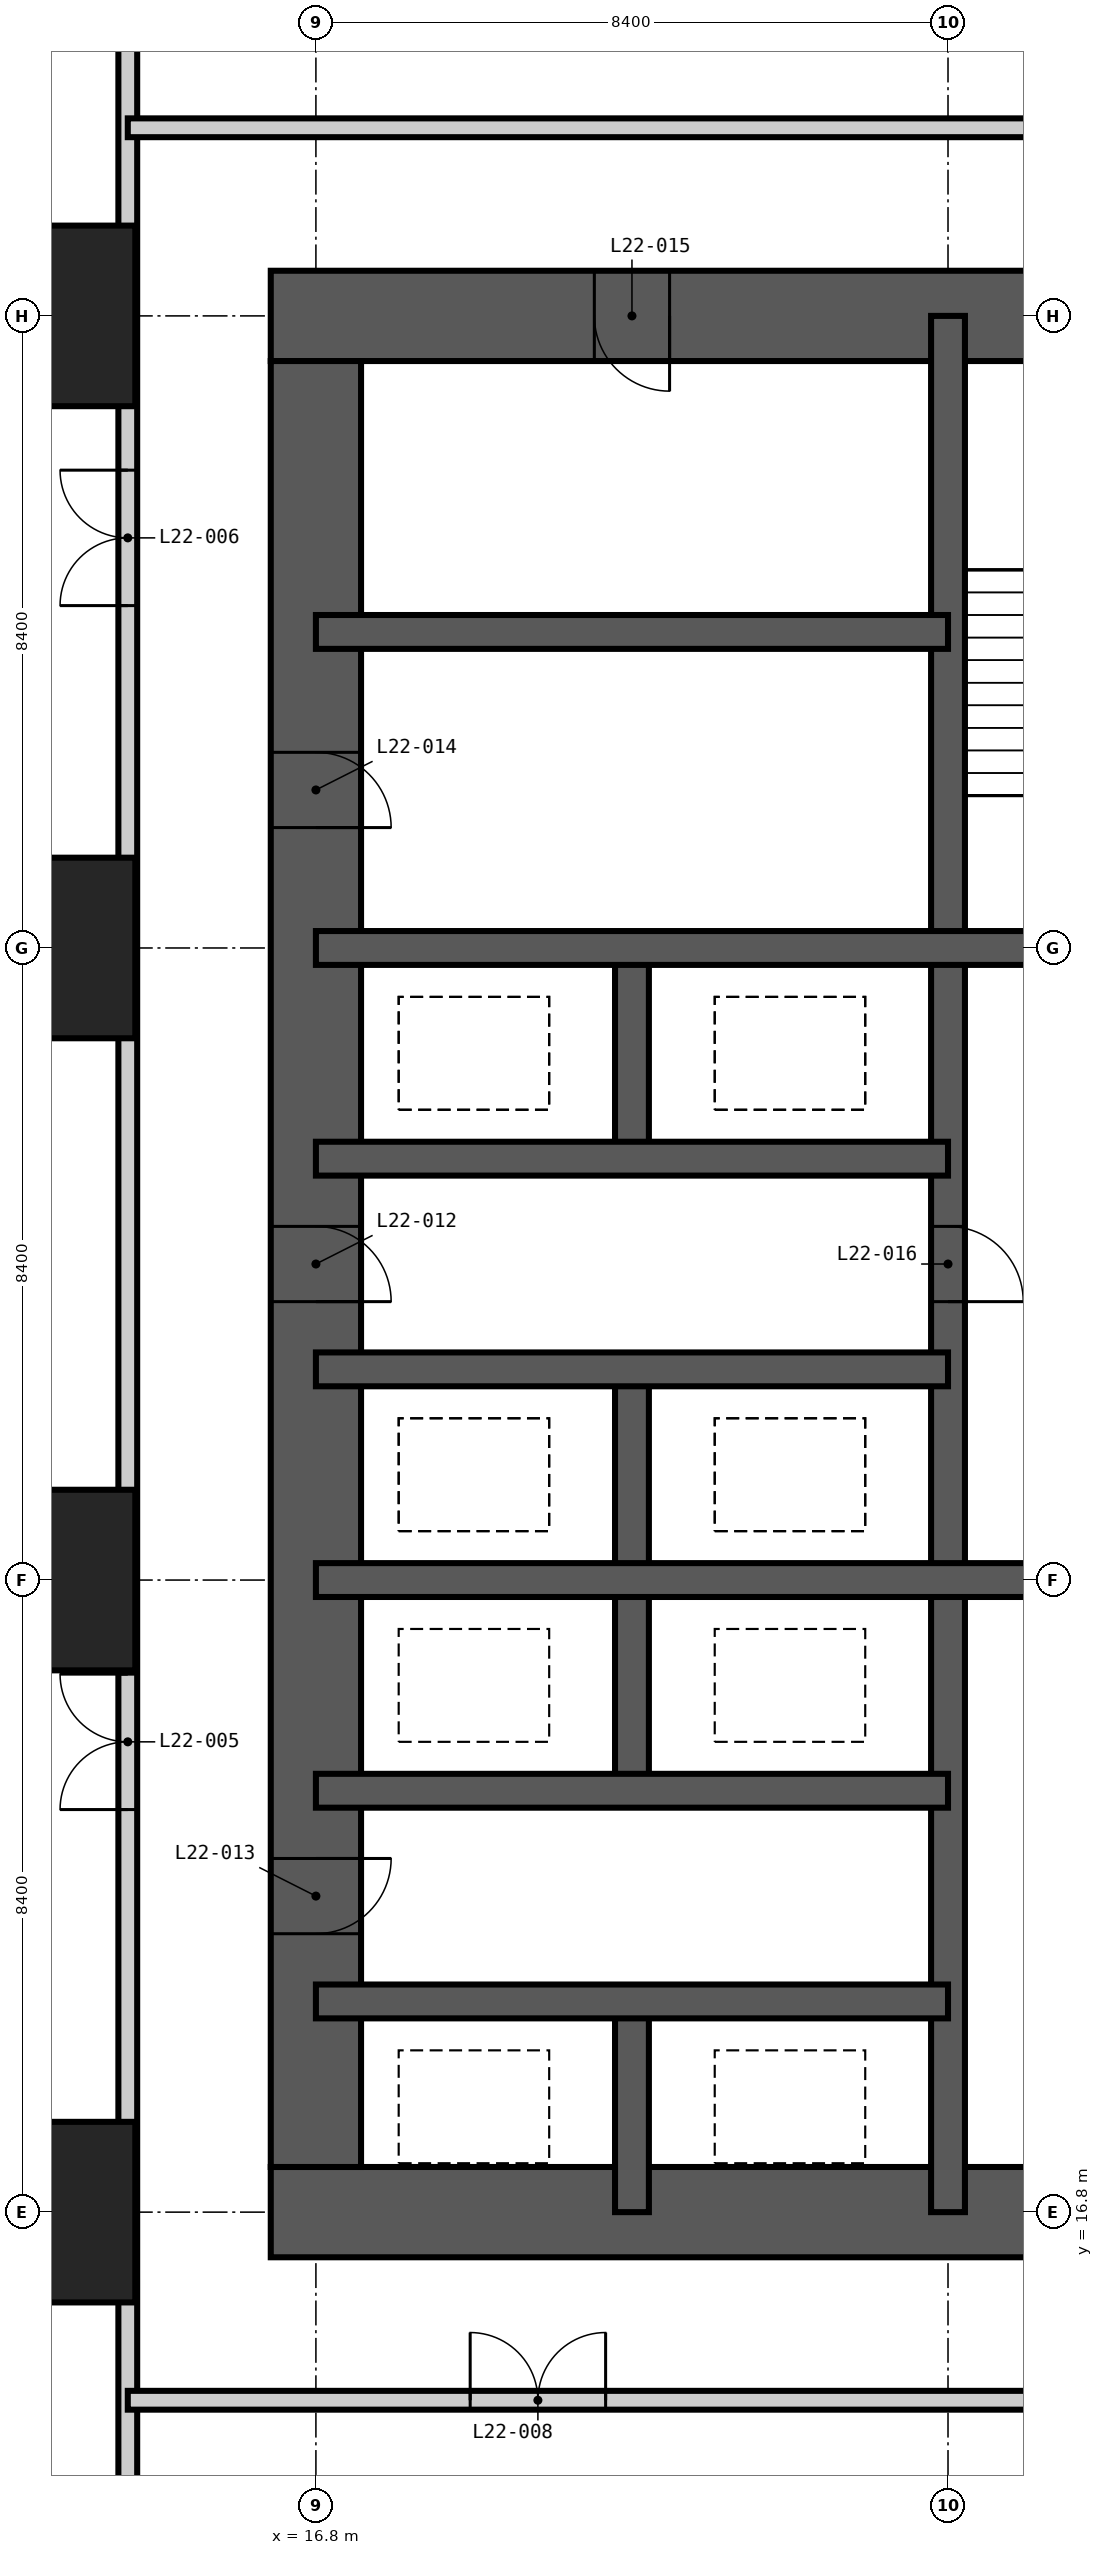
"""IFC4 building model, lengths in metres.
Left out: names, types, materials, properties, quantities, classifications, styles, units other than length and angle.
Written with IfcOpenShell. Run it as: python <this file> out.ifc"""

import sys

from ifc_helpers import new_model, si_unit, direction, frame, frame_2d, origin, origin_2d, place, context, subcontext, project, spatial, rectangle, extrude, element, fill, save


model = new_model("IFC4")
c1 = context("Model", 3, precision=1e-05, world=origin(), true_north=direction((0.0, 1.0)))
c2 = subcontext(c1, "Body", "Model", "MODEL_VIEW")
j1 = project(units=[si_unit("LENGTHUNIT", "METRE"), si_unit("PLANEANGLEUNIT", "RADIAN")], contexts=[c1])
p1 = place(None, origin())
s1 = spatial("IfcSite", under=j1, at=p1, CompositionType="ELEMENT")
p2 = place(p1, origin())
s2 = spatial("IfcBuilding", under=s1, at=p2, CompositionType="ELEMENT")
p3 = place(p2, frame((0.0, 0.0, 88.2)))
s3 = spatial("IfcBuildingStorey", under=s2, at=p3, CompositionType="ELEMENT", Elevation=88.2)
for number, where, z_axis, x_axis in (
    (1, (13.2, 16.8, -0.4), (0.0, 0.0, 1.0), (1.0, 0.0, 0.0)),
    (2, (13.2, 25.2, -0.4), (0.0, 0.0, 1.0), (1.0, 0.0, 0.0)),
    (3, (13.2, 33.6, -0.4), (0.0, 0.0, 1.0), (1.0, 0.0, 0.0)),
    (4, (13.2, 42.0, -0.4), (0.0, 0.0, 1.0), (1.0, 0.0, 0.0)),
):
    element("IfcColumn", number, at=place(p3, frame(where, z_axis=z_axis, x_axis=x_axis)), inside=s3, PredefinedType="COLUMN", context=c2, shape_type="SweptSolid", body=[
        extrude(rectangle(XDim=2.4, YDim=2.4, at=origin_2d()), origin(), (0.0, 0.0, 1.0), 5.45),
    ])
p4 = place(p3, frame((16.2, 16.8, -0.4), z_axis=(0.0, 0.0, 1.0), x_axis=(1.0, 0.0, 0.0)))
e5 = element("IfcWall", 5, at=p4, inside=s3, PredefinedType="SHEAR", context=c2, shape_type="SweptSolid", body=[
    extrude(rectangle(XDim=26.4, YDim=1.2, at=frame_2d((13.2, 0.0))), origin(), (0.0, 0.0, 1.0), 5.45),
])
p5 = place(p4, frame((12.7, 0.0, 0.4)))
e6 = element("IfcOpeningElement", 6, at=p5, cuts=e5, PredefinedType="OPENING", context=c2, shape_type="SweptSolid", body=[
    extrude(rectangle(XDim=1.0, YDim=2.1, at=frame_2d((0.5, 1.05))), frame((0.0, 0.61, 0.0), z_axis=(0.0, -1.0, 0.0), x_axis=(1.0, 0.0, 0.0)), (0.0, 0.0, 1.0), 1.22),
])
p6 = place(p4, frame((19.0, 0.0, 0.4)))
e7 = element("IfcOpeningElement", 7, at=p6, cuts=e5, PredefinedType="OPENING", context=c2, shape_type="SweptSolid", body=[
    extrude(rectangle(XDim=1.0, YDim=2.1, at=frame_2d((0.5, 1.05))), frame((0.0, 0.61, 0.0), z_axis=(0.0, -1.0, 0.0), x_axis=(1.0, 0.0, 0.0)), (0.0, 0.0, 1.0), 1.22),
])
p7 = place(p3, frame((42.6, 42.0, -0.4), z_axis=(0.0, 0.0, 1.0), x_axis=(-1.0, 0.0, 0.0)))
e8 = element("IfcWall", 8, at=p7, inside=s3, PredefinedType="SHEAR", context=c2, shape_type="SweptSolid", body=[
    extrude(rectangle(XDim=26.4, YDim=1.2, at=frame_2d((13.2, 0.0))), origin(), (0.0, 0.0, 1.0), 5.45),
])
p8 = place(p7, frame((21.1, 0.0, 0.4)))
e9 = element("IfcOpeningElement", 9, at=p8, cuts=e8, PredefinedType="OPENING", context=c2, shape_type="SweptSolid", body=[
    extrude(rectangle(XDim=1.0, YDim=2.1, at=frame_2d((0.5, 1.05))), frame((0.0, 0.61, 0.0), z_axis=(0.0, -1.0, 0.0), x_axis=(1.0, 0.0, 0.0)), (0.0, 0.0, 1.0), 1.22),
])
p9 = place(p7, frame((10.5, 0.0, 0.4)))
e10 = element("IfcOpeningElement", 10, at=p9, cuts=e8, PredefinedType="OPENING", context=c2, shape_type="SweptSolid", body=[
    extrude(rectangle(XDim=1.2, YDim=2.2, at=frame_2d((0.6, 1.1))), frame((0.0, 0.61, 0.0), z_axis=(0.0, -1.0, 0.0), x_axis=(1.0, 0.0, 0.0)), (0.0, 0.0, 1.0), 1.22),
])
p10 = place(p3, frame((16.8, 41.4, -0.4), z_axis=(0.0, 0.0, 1.0), x_axis=(0.0, -1.0, 0.0)))
e11 = element("IfcWall", 11, at=p10, inside=s3, PredefinedType="SHEAR", context=c2, shape_type="SweptSolid", body=[
    extrude(rectangle(XDim=24.0, YDim=1.2, at=frame_2d((12.0, 0.0))), origin(), (0.0, 0.0, 1.0), 5.45),
])
p11 = place(p10, frame((11.5, 0.0, 0.4)))
e12 = element("IfcOpeningElement", 12, at=p11, cuts=e11, PredefinedType="OPENING", context=c2, shape_type="SweptSolid", body=[
    extrude(rectangle(XDim=1.0, YDim=2.1, at=frame_2d((0.5, 1.05))), frame((0.0, 0.61, 0.0), z_axis=(0.0, -1.0, 0.0), x_axis=(1.0, 0.0, 0.0)), (0.0, 0.0, 1.0), 1.22),
])
p12 = place(p10, frame((19.9, 0.0, 0.4)))
e13 = element("IfcOpeningElement", 13, at=p12, cuts=e11, PredefinedType="OPENING", context=c2, shape_type="SweptSolid", body=[
    extrude(rectangle(XDim=1.0, YDim=2.1, at=frame_2d((0.5, 1.05))), frame((0.0, 0.61, 0.0), z_axis=(0.0, -1.0, 0.0), x_axis=(1.0, 0.0, 0.0)), (0.0, 0.0, 1.0), 1.22),
])
p13 = place(p10, frame((5.2, 0.0, 0.4)))
e14 = element("IfcOpeningElement", 14, at=p13, cuts=e11, PredefinedType="OPENING", context=c2, shape_type="SweptSolid", body=[
    extrude(rectangle(XDim=1.0, YDim=2.1, at=frame_2d((0.5, 1.05))), frame((0.0, 0.61, 0.0), z_axis=(0.0, -1.0, 0.0), x_axis=(1.0, 0.0, 0.0)), (0.0, 0.0, 1.0), 1.22),
])
p14 = place(p3, frame((21.0, 16.8, -0.4), z_axis=(0.0, 0.0, 1.0), x_axis=(0.0, 1.0, 0.0)))
e15 = element("IfcWall", 15, at=p14, inside=s3, PredefinedType="SHEAR", context=c2, shape_type="SweptSolid", body=[
    extrude(rectangle(XDim=2.8, YDim=0.45, at=frame_2d((1.4, 0.0))), origin(), (0.0, 0.0, 1.0), 5.45),
])
p15 = place(p3, frame((21.0, 22.4, -0.4), z_axis=(0.0, 0.0, 1.0), x_axis=(0.0, 1.0, 0.0)))
e16 = element("IfcWall", 16, at=p15, inside=s3, PredefinedType="SHEAR", context=c2, shape_type="SweptSolid", body=[
    extrude(rectangle(XDim=5.6, YDim=0.45, at=frame_2d((2.8, 0.0))), origin(), (0.0, 0.0, 1.0), 5.45),
])
p16 = place(p3, frame((21.0, 30.8, -0.4), z_axis=(0.0, 0.0, 1.0), x_axis=(0.0, 1.0, 0.0)))
e17 = element("IfcWall", 17, at=p16, inside=s3, PredefinedType="SHEAR", context=c2, shape_type="SweptSolid", body=[
    extrude(rectangle(XDim=2.8, YDim=0.45, at=frame_2d((1.4, 0.0))), origin(), (0.0, 0.0, 1.0), 5.45),
])
p17 = place(p3, frame((25.2, 16.8, -0.4), z_axis=(0.0, 0.0, 1.0), x_axis=(0.0, 1.0, 0.0)))
e18 = element("IfcWall", 18, at=p17, inside=s3, PredefinedType="SHEAR", context=c2, shape_type="SweptSolid", body=[
    extrude(rectangle(XDim=25.2, YDim=0.45, at=frame_2d((12.6, 0.0))), origin(), (0.0, 0.0, 1.0), 5.45),
])
p18 = place(p17, frame((12.1, 0.0, 0.4)))
e19 = element("IfcOpeningElement", 19, at=p18, cuts=e18, PredefinedType="OPENING", context=c2, shape_type="SweptSolid", body=[
    extrude(rectangle(XDim=1.0, YDim=2.1, at=frame_2d((0.5, 1.05))), frame((0.0, 0.235, 0.0), z_axis=(0.0, -1.0, 0.0), x_axis=(1.0, 0.0, 0.0)), (0.0, 0.0, 1.0), 0.47),
])
for number, where, z_axis, x_axis in (
    (20, (16.8, 19.6, -0.4), (0.0, 0.0, 1.0), (1.0, 0.0, 0.0)),
    (21, (16.8, 22.4, -0.4), (0.0, 0.0, 1.0), (1.0, 0.0, 0.0)),
):
    element("IfcWall", number, at=place(p3, frame(where, z_axis=z_axis, x_axis=x_axis)), inside=s3, PredefinedType="SHEAR", context=c2, shape_type="SweptSolid", body=[
        extrude(rectangle(XDim=8.4, YDim=0.45, at=frame_2d((4.2, 0.0))), origin(), (0.0, 0.0, 1.0), 5.45),
    ])
p19 = place(p3, frame((16.8, 25.2, -0.4), z_axis=(0.0, 0.0, 1.0), x_axis=(1.0, 0.0, 0.0)))
e22 = element("IfcWall", 22, at=p19, inside=s3, PredefinedType="SHEAR", context=c2, shape_type="SweptSolid", body=[
    extrude(rectangle(XDim=25.2, YDim=0.45, at=frame_2d((12.6, 0.0))), origin(), (0.0, 0.0, 1.0), 5.45),
])
for number, where, z_axis, x_axis in (
    (23, (16.8, 28.0, -0.4), (0.0, 0.0, 1.0), (1.0, 0.0, 0.0)),
    (24, (16.8, 30.8, -0.4), (0.0, 0.0, 1.0), (1.0, 0.0, 0.0)),
):
    element("IfcWall", number, at=place(p3, frame(where, z_axis=z_axis, x_axis=x_axis)), inside=s3, PredefinedType="SHEAR", context=c2, shape_type="SweptSolid", body=[
        extrude(rectangle(XDim=8.4, YDim=0.45, at=frame_2d((4.2, 0.0))), origin(), (0.0, 0.0, 1.0), 5.45),
    ])
p20 = place(p3, frame((16.8, 33.6, -0.4), z_axis=(0.0, 0.0, 1.0), x_axis=(1.0, 0.0, 0.0)))
e25 = element("IfcWall", 25, at=p20, inside=s3, PredefinedType="SHEAR", context=c2, shape_type="SweptSolid", body=[
    extrude(rectangle(XDim=25.2, YDim=0.45, at=frame_2d((12.6, 0.0))), origin(), (0.0, 0.0, 1.0), 5.45),
])
p21 = place(p3, frame((16.8, 37.8, -0.4), z_axis=(0.0, 0.0, 1.0), x_axis=(1.0, 0.0, 0.0)))
e26 = element("IfcWall", 26, at=p21, inside=s3, PredefinedType="SHEAR", context=c2, shape_type="SweptSolid", body=[
    extrude(rectangle(XDim=8.4, YDim=0.45, at=frame_2d((4.2, 0.0))), origin(), (0.0, 0.0, 1.0), 5.45),
])
p22 = place(p3, frame((14.3, -0.018, 0.0), z_axis=(0.0, 0.0, 1.0), x_axis=(0.0, 1.0, 0.0)))
e27 = element("IfcWall", 27, at=p22, inside=s3, PredefinedType="PARTITIONING", context=c2, shape_type="SweptSolid", body=[
    extrude(rectangle(XDim=58.836, YDim=0.25, at=frame_2d((29.418, 0.0))), origin(), (0.0, 0.0, 1.0), 5.05),
])
p23 = place(p22, frame((22.168, 0.0, 0.0)))
e28 = element("IfcOpeningElement", 28, at=p23, cuts=e27, PredefinedType="OPENING", context=c2, shape_type="SweptSolid", body=[
    extrude(rectangle(XDim=1.8, YDim=2.4, at=frame_2d((0.9, 1.2))), frame((0.0, 0.135, 0.0), z_axis=(0.0, -1.0, 0.0), x_axis=(1.0, 0.0, 0.0)), (0.0, 0.0, 1.0), 0.27),
])
p24 = place(p22, frame((38.168, 0.0, 0.0)))
e29 = element("IfcOpeningElement", 29, at=p24, cuts=e27, PredefinedType="OPENING", context=c2, shape_type="SweptSolid", body=[
    extrude(rectangle(XDim=1.8, YDim=2.4, at=frame_2d((0.9, 1.2))), frame((0.0, 0.135, 0.0), z_axis=(0.0, -1.0, 0.0), x_axis=(1.0, 0.0, 0.0)), (0.0, 0.0, 1.0), 0.27),
])
p25 = place(p3, frame((14.3, 14.3, 0.0), z_axis=(0.0, 0.0, 1.0), x_axis=(1.0, 0.0, 0.0)))
e30 = element("IfcWall", 30, at=p25, inside=s3, PredefinedType="PARTITIONING", context=c2, shape_type="SweptSolid", body=[
    extrude(rectangle(XDim=30.2, YDim=0.25, at=frame_2d((15.1, 0.0))), origin(), (0.0, 0.0, 1.0), 5.05),
])
p26 = place(p25, frame((19.65, 0.0, 0.0)))
e31 = element("IfcOpeningElement", 31, at=p26, cuts=e30, PredefinedType="OPENING", context=c2, shape_type="SweptSolid", body=[
    extrude(rectangle(XDim=1.8, YDim=2.4, at=frame_2d((0.9, 1.2))), frame((0.0, 0.135, 0.0), z_axis=(0.0, -1.0, 0.0), x_axis=(1.0, 0.0, 0.0)), (0.0, 0.0, 1.0), 0.27),
])
p27 = place(p25, frame((4.55, 0.0, 0.0)))
e32 = element("IfcOpeningElement", 32, at=p27, cuts=e30, PredefinedType="OPENING", context=c2, shape_type="SweptSolid", body=[
    extrude(rectangle(XDim=1.8, YDim=2.4, at=frame_2d((0.9, 1.2))), frame((0.0, 0.135, 0.0), z_axis=(0.0, -1.0, 0.0), x_axis=(1.0, 0.0, 0.0)), (0.0, 0.0, 1.0), 0.27),
])
p28 = place(p3, frame((14.3, 44.5, 0.0), z_axis=(0.0, 0.0, 1.0), x_axis=(1.0, 0.0, 0.0)))
e33 = element("IfcWall", 33, at=p28, inside=s3, PredefinedType="PARTITIONING", context=c2, shape_type="SweptSolid", body=[
    extrude(rectangle(XDim=30.2, YDim=0.25, at=frame_2d((15.1, 0.0))), origin(), (0.0, 0.0, 1.0), 5.05),
])
p29 = place(p28, frame((19.65, 0.0, 0.0)))
e34 = element("IfcOpeningElement", 34, at=p29, cuts=e33, PredefinedType="OPENING", context=c2, shape_type="SweptSolid", body=[
    extrude(rectangle(XDim=1.8, YDim=2.4, at=frame_2d((0.9, 1.2))), frame((0.0, 0.135, 0.0), z_axis=(0.0, -1.0, 0.0), x_axis=(1.0, 0.0, 0.0)), (0.0, 0.0, 1.0), 0.27),
])
p30 = place(p23, origin())
e35 = element("IfcDoor", 35, at=p30, inside=s3, OperationType="DOUBLE_DOOR_DOUBLE_SWING", PredefinedType="DOOR", context=c2, shape_type="SweptSolid", body=[
    extrude(rectangle(XDim=1.8, YDim=2.4, at=frame_2d((0.9, 1.2))), frame((0.0, 0.025, 0.0), z_axis=(0.0, -1.0, 0.0), x_axis=(1.0, 0.0, 0.0)), (0.0, 0.0, 1.0), 0.05),
])
fill(e28, e35)
p31 = place(p24, origin())
e36 = element("IfcDoor", 36, at=p31, inside=s3, OperationType="DOUBLE_DOOR_DOUBLE_SWING", PredefinedType="DOOR", context=c2, shape_type="SweptSolid", body=[
    extrude(rectangle(XDim=1.8, YDim=2.4, at=frame_2d((0.9, 1.2))), frame((0.0, 0.025, 0.0), z_axis=(0.0, -1.0, 0.0), x_axis=(1.0, 0.0, 0.0)), (0.0, 0.0, 1.0), 0.05),
])
fill(e29, e36)
p32 = place(p27, origin())
e37 = element("IfcDoor", 37, at=p32, inside=s3, OperationType="DOUBLE_DOOR_DOUBLE_SWING", PredefinedType="DOOR", context=c2, shape_type="SweptSolid", body=[
    extrude(rectangle(XDim=1.8, YDim=2.4, at=frame_2d((0.9, 1.2))), frame((0.0, 0.025, 0.0), z_axis=(0.0, -1.0, 0.0), x_axis=(1.0, 0.0, 0.0)), (0.0, 0.0, 1.0), 0.05),
])
fill(e32, e37)
p33 = place(p11, origin())
e38 = element("IfcDoor", 38, at=p33, inside=s3, OperationType="SINGLE_SWING_RIGHT", PredefinedType="DOOR", context=c2, shape_type="SweptSolid", body=[
    extrude(rectangle(XDim=1.0, YDim=2.1, at=frame_2d((0.5, 1.05))), frame((0.0, 0.025, 0.0), z_axis=(0.0, -1.0, 0.0), x_axis=(1.0, 0.0, 0.0)), (0.0, 0.0, 1.0), 0.05),
])
fill(e12, e38)
p34 = place(p12, origin())
e39 = element("IfcDoor", 39, at=p34, inside=s3, OperationType="SINGLE_SWING_LEFT", PredefinedType="DOOR", context=c2, shape_type="SweptSolid", body=[
    extrude(rectangle(XDim=1.0, YDim=2.1, at=frame_2d((0.5, 1.05))), frame((0.0, 0.025, 0.0), z_axis=(0.0, -1.0, 0.0), x_axis=(1.0, 0.0, 0.0)), (0.0, 0.0, 1.0), 0.05),
])
fill(e13, e39)
p35 = place(p13, origin())
e40 = element("IfcDoor", 40, at=p35, inside=s3, OperationType="SINGLE_SWING_RIGHT", PredefinedType="DOOR", context=c2, shape_type="SweptSolid", body=[
    extrude(rectangle(XDim=1.0, YDim=2.1, at=frame_2d((0.5, 1.05))), frame((0.0, 0.025, 0.0), z_axis=(0.0, -1.0, 0.0), x_axis=(1.0, 0.0, 0.0)), (0.0, 0.0, 1.0), 0.05),
])
fill(e14, e40)
p36 = place(p8, origin())
e41 = element("IfcDoor", 41, at=p36, inside=s3, OperationType="SINGLE_SWING_LEFT", PredefinedType="DOOR", context=c2, shape_type="SweptSolid", body=[
    extrude(rectangle(XDim=1.0, YDim=2.1, at=frame_2d((0.5, 1.05))), frame((0.0, 0.025, 0.0), z_axis=(0.0, -1.0, 0.0), x_axis=(1.0, 0.0, 0.0)), (0.0, 0.0, 1.0), 0.05),
])
fill(e9, e41)
p37 = place(p18, frame((1.0, 0.0, 0.0), z_axis=(0.0, 0.0, 1.0), x_axis=(-1.0, 0.0, 0.0)))
e42 = element("IfcDoor", 42, at=p37, inside=s3, OperationType="SINGLE_SWING_RIGHT", PredefinedType="DOOR", context=c2, shape_type="SweptSolid", body=[
    extrude(rectangle(XDim=1.0, YDim=2.1, at=frame_2d((0.5, 1.05))), frame((0.0, 0.025, 0.0), z_axis=(0.0, -1.0, 0.0), x_axis=(1.0, 0.0, 0.0)), (0.0, 0.0, 1.0), 0.05),
])
fill(e19, e42)
save(model, sys.argv[1])
